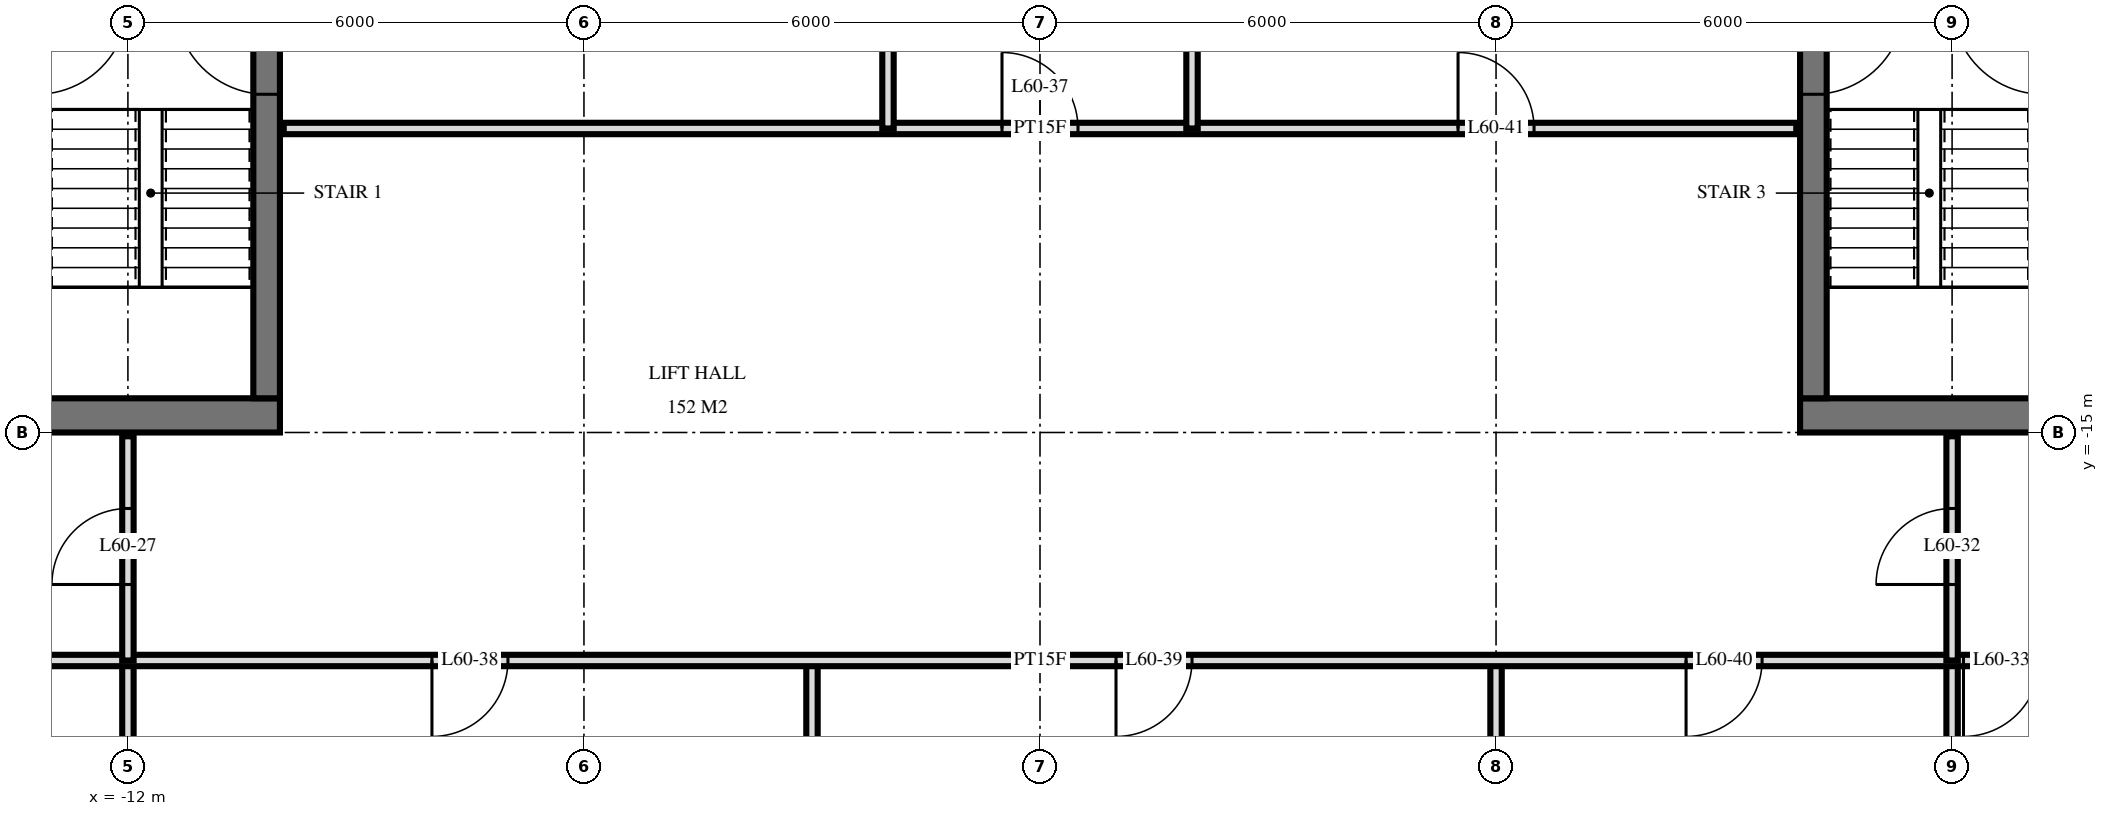
"""IFC4 building model, lengths in metres.
Left out: names, types, materials, properties, quantities, classifications, styles, units other than length and angle.
Written with IfcOpenShell. Run it as: python <this file> out.ifc"""

import sys

from ifc_helpers import new_model, si_unit, direction, frame, frame_2d, origin, place, context, subcontext, project, spatial, rectangle, extrude, element, fill, save


model = new_model("IFC4")
c1 = context("Model", 3, precision=1e-05, world=origin(), true_north=direction((0.0, 1.0)))
c2 = subcontext(c1, "Body", "Model", "MODEL_VIEW")
j1 = project(units=[si_unit("LENGTHUNIT", "METRE"), si_unit("PLANEANGLEUNIT", "RADIAN")], contexts=[c1])
p1 = place(None, origin())
s1 = spatial("IfcSite", under=j1, at=p1, CompositionType="ELEMENT")
p2 = place(p1, origin())
s2 = spatial("IfcBuilding", under=s1, at=p2, CompositionType="ELEMENT")
p3 = place(p2, frame((0.0, 0.0, 229.1)))
s3 = spatial("IfcBuildingStorey", under=s2, at=p3, CompositionType="ELEMENT", Elevation=229.1)
p4 = place(p3, frame((-24.5, -14.775, 0.0), z_axis=(0.0, 0.0, 1.0), x_axis=(1.0, 0.0, 0.0)))
e1 = element("IfcWall", 1, at=p4, inside=s3, PredefinedType="SHEAR", context=c2, shape_type="SweptSolid", body=[
    extrude(rectangle(XDim=14.5, YDim=0.45, at=frame_2d((7.25, 0.0))), origin(), (0.0, 0.0, 1.0), 3.5),
])
p5 = place(p4, frame((6.2, 0.0, 0.0)))
e2 = element("IfcOpeningElement", 2, at=p5, cuts=e1, PredefinedType="OPENING", context=c2, shape_type="SweptSolid", body=[
    extrude(rectangle(XDim=1.2, YDim=2.1, at=frame_2d((0.6, 1.05))), frame((0.0, 0.235, 0.0), z_axis=(0.0, -1.0, 0.0), x_axis=(1.0, 0.0, 0.0)), (0.0, 0.0, 1.0), 0.47),
])
p6 = place(p4, frame((9.25, 0.0, 0.0)))
e3 = element("IfcOpeningElement", 3, at=p6, cuts=e1, PredefinedType="OPENING", context=c2, shape_type="SweptSolid", body=[
    extrude(rectangle(XDim=1.1, YDim=2.1, at=frame_2d((0.55, 1.05))), frame((0.0, 0.235, 0.0), z_axis=(0.0, -1.0, 0.0), x_axis=(1.0, 0.0, 0.0)), (0.0, 0.0, 1.0), 0.47),
])
p7 = place(p4, frame((3.5, 0.0, 0.0)))
e4 = element("IfcOpeningElement", 4, at=p7, cuts=e1, PredefinedType="OPENING", context=c2, shape_type="SweptSolid", body=[
    extrude(rectangle(XDim=0.9, YDim=2.1, at=frame_2d((0.45, 1.05))), frame((0.0, 0.235, 0.0), z_axis=(0.0, -1.0, 0.0), x_axis=(1.0, 0.0, 0.0)), (0.0, 0.0, 1.0), 0.47),
])
p8 = place(p4, frame((1.05, 0.0, 0.0)))
e5 = element("IfcOpeningElement", 5, at=p8, cuts=e1, PredefinedType="OPENING", context=c2, shape_type="SweptSolid", body=[
    extrude(rectangle(XDim=1.0, YDim=2.1, at=frame_2d((0.5, 1.05))), frame((0.0, 0.235, 0.0), z_axis=(0.0, -1.0, 0.0), x_axis=(1.0, 0.0, 0.0)), (0.0, 0.0, 1.0), 0.47),
])
p9 = place(p3, frame((-10.175, -14.55, 0.0), z_axis=(0.0, 0.0, 1.0), x_axis=(0.0, 1.0, 0.0)))
e6 = element("IfcWall", 6, at=p9, inside=s3, PredefinedType="SHEAR", context=c2, shape_type="SweptSolid", body=[
    extrude(rectangle(XDim=14.1, YDim=0.35, at=frame_2d((7.05, 0.0))), origin(), (0.0, 0.0, 1.0), 3.5),
])
p10 = place(p9, frame((8.4, 0.0, 0.0)))
e7 = element("IfcOpeningElement", 7, at=p10, cuts=e6, PredefinedType="OPENING", context=c2, shape_type="SweptSolid", body=[
    extrude(rectangle(XDim=1.4, YDim=2.4, at=frame_2d((0.7, 1.2))), frame((0.0, 0.185, 0.0), z_axis=(0.0, -1.0, 0.0), x_axis=(1.0, 0.0, 0.0)), (0.0, 0.0, 1.0), 0.37),
])
p11 = place(p9, frame((10.0, 0.0, 0.0)))
e8 = element("IfcOpeningElement", 8, at=p11, cuts=e6, PredefinedType="OPENING", context=c2, shape_type="SweptSolid", body=[
    extrude(rectangle(XDim=1.4, YDim=2.4, at=frame_2d((0.7, 1.2))), frame((0.0, 0.185, 0.0), z_axis=(0.0, -1.0, 0.0), x_axis=(1.0, 0.0, 0.0)), (0.0, 0.0, 1.0), 0.37),
])
p12 = place(p9, frame((4.0, 0.0, 0.0)))
e9 = element("IfcOpeningElement", 9, at=p12, cuts=e6, PredefinedType="OPENING", context=c2, shape_type="SweptSolid", body=[
    extrude(rectangle(XDim=1.2, YDim=2.1, at=frame_2d((0.6, 1.05))), frame((0.0, 0.185, 0.0), z_axis=(0.0, -1.0, 0.0), x_axis=(1.0, 0.0, 0.0)), (0.0, 0.0, 1.0), 0.37),
])
p13 = place(p3, frame((10.0, -14.775, 0.0), z_axis=(0.0, 0.0, 1.0), x_axis=(1.0, 0.0, 0.0)))
e10 = element("IfcWall", 10, at=p13, inside=s3, PredefinedType="SHEAR", context=c2, shape_type="SweptSolid", body=[
    extrude(rectangle(XDim=14.5, YDim=0.45, at=frame_2d((7.25, 0.0))), origin(), (0.0, 0.0, 1.0), 3.5),
])
p14 = place(p13, frame((7.1, 0.0, 0.0)))
e11 = element("IfcOpeningElement", 11, at=p14, cuts=e10, PredefinedType="OPENING", context=c2, shape_type="SweptSolid", body=[
    extrude(rectangle(XDim=1.2, YDim=2.1, at=frame_2d((0.6, 1.05))), frame((0.0, 0.235, 0.0), z_axis=(0.0, -1.0, 0.0), x_axis=(1.0, 0.0, 0.0)), (0.0, 0.0, 1.0), 0.47),
])
p15 = place(p13, frame((4.15, 0.0, 0.0)))
e12 = element("IfcOpeningElement", 12, at=p15, cuts=e10, PredefinedType="OPENING", context=c2, shape_type="SweptSolid", body=[
    extrude(rectangle(XDim=1.1, YDim=2.1, at=frame_2d((0.55, 1.05))), frame((0.0, 0.235, 0.0), z_axis=(0.0, -1.0, 0.0), x_axis=(1.0, 0.0, 0.0)), (0.0, 0.0, 1.0), 0.47),
])
p16 = place(p13, frame((10.1, 0.0, 0.0)))
e13 = element("IfcOpeningElement", 13, at=p16, cuts=e10, PredefinedType="OPENING", context=c2, shape_type="SweptSolid", body=[
    extrude(rectangle(XDim=0.9, YDim=2.1, at=frame_2d((0.45, 1.05))), frame((0.0, 0.235, 0.0), z_axis=(0.0, -1.0, 0.0), x_axis=(1.0, 0.0, 0.0)), (0.0, 0.0, 1.0), 0.47),
])
p17 = place(p13, frame((12.45, 0.0, 0.0)))
e14 = element("IfcOpeningElement", 14, at=p17, cuts=e10, PredefinedType="OPENING", context=c2, shape_type="SweptSolid", body=[
    extrude(rectangle(XDim=1.0, YDim=2.1, at=frame_2d((0.5, 1.05))), frame((0.0, 0.235, 0.0), z_axis=(0.0, -1.0, 0.0), x_axis=(1.0, 0.0, 0.0)), (0.0, 0.0, 1.0), 0.47),
])
p18 = place(p3, frame((10.175, -14.55, 0.0), z_axis=(0.0, 0.0, 1.0), x_axis=(0.0, 1.0, 0.0)))
e15 = element("IfcWall", 15, at=p18, inside=s3, PredefinedType="SHEAR", context=c2, shape_type="SweptSolid", body=[
    extrude(rectangle(XDim=14.1, YDim=0.35, at=frame_2d((7.05, 0.0))), origin(), (0.0, 0.0, 1.0), 3.5),
])
p19 = place(p18, frame((8.4, 0.0, 0.0)))
e16 = element("IfcOpeningElement", 16, at=p19, cuts=e15, PredefinedType="OPENING", context=c2, shape_type="SweptSolid", body=[
    extrude(rectangle(XDim=1.4, YDim=2.4, at=frame_2d((0.7, 1.2))), frame((0.0, 0.185, 0.0), z_axis=(0.0, -1.0, 0.0), x_axis=(1.0, 0.0, 0.0)), (0.0, 0.0, 1.0), 0.37),
])
p20 = place(p18, frame((10.0, 0.0, 0.0)))
e17 = element("IfcOpeningElement", 17, at=p20, cuts=e15, PredefinedType="OPENING", context=c2, shape_type="SweptSolid", body=[
    extrude(rectangle(XDim=1.4, YDim=2.4, at=frame_2d((0.7, 1.2))), frame((0.0, 0.185, 0.0), z_axis=(0.0, -1.0, 0.0), x_axis=(1.0, 0.0, 0.0)), (0.0, 0.0, 1.0), 0.37),
])
p21 = place(p18, frame((4.0, 0.0, 0.0)))
e18 = element("IfcOpeningElement", 18, at=p21, cuts=e15, PredefinedType="OPENING", context=c2, shape_type="SweptSolid", body=[
    extrude(rectangle(XDim=1.2, YDim=2.1, at=frame_2d((0.6, 1.05))), frame((0.0, 0.185, 0.0), z_axis=(0.0, -1.0, 0.0), x_axis=(1.0, 0.0, 0.0)), (0.0, 0.0, 1.0), 0.37),
])
p22 = place(p3, frame((12.0, -18.0, 0.0), z_axis=(0.0, 0.0, 1.0), x_axis=(0.0, 1.0, 0.0)))
e19 = element("IfcWall", 19, at=p22, inside=s3, PredefinedType="PARTITIONING", context=c2, shape_type="SweptSolid", body=[
    extrude(rectangle(XDim=2.95, YDim=0.15, at=frame_2d((1.475, 0.0))), origin(), (0.0, 0.0, 1.0), 3.22),
])
p23 = place(p22, frame((1.0, 0.0, 0.0)))
e20 = element("IfcOpeningElement", 20, at=p23, cuts=e19, PredefinedType="OPENING", context=c2, shape_type="SweptSolid", body=[
    extrude(rectangle(XDim=1.0, YDim=2.1, at=frame_2d((0.5, 1.05))), frame((0.0, 0.085, 0.0), z_axis=(0.0, -1.0, 0.0), x_axis=(1.0, 0.0, 0.0)), (0.0, 0.0, 1.0), 0.17),
])
for number, where, z_axis, x_axis in (
    (21, (12.0, -29.22, 0.0), (0.0, 0.0, 1.0), (0.0, 1.0, 0.0)),
    (22, (6.0, -29.22, 0.0), (0.0, 0.0, 1.0), (0.0, 1.0, 0.0)),
):
    element("IfcWall", number, at=place(p3, frame(where, z_axis=z_axis, x_axis=x_axis)), inside=s3, PredefinedType="PARTITIONING", context=c2, shape_type="SweptSolid", body=[
        extrude(rectangle(XDim=11.22, YDim=0.15, at=frame_2d((5.61, 0.0))), origin(), (0.0, 0.0, 1.0), 3.22),
    ])
for number, where, z_axis, x_axis in (
    (23, (2.0, -11.0, 0.0), (0.0, 0.0, 1.0), (0.0, 1.0, 0.0)),
    (24, (-2.0, -11.0, 0.0), (0.0, 0.0, 1.0), (0.0, 1.0, 0.0)),
):
    element("IfcWall", number, at=place(p3, frame(where, z_axis=z_axis, x_axis=x_axis)), inside=s3, PredefinedType="PARTITIONING", context=c2, shape_type="SweptSolid", body=[
        extrude(rectangle(XDim=4.0, YDim=0.15, at=frame_2d((2.0, 0.0))), origin(), (0.0, 0.0, 1.0), 3.22),
    ])
p24 = place(p3, frame((-3.0, -29.22, 0.0), z_axis=(0.0, 0.0, 1.0), x_axis=(0.0, 1.0, 0.0)))
e25 = element("IfcWall", 25, at=p24, inside=s3, PredefinedType="PARTITIONING", context=c2, shape_type="SweptSolid", body=[
    extrude(rectangle(XDim=11.22, YDim=0.15, at=frame_2d((5.61, 0.0))), origin(), (0.0, 0.0, 1.0), 3.22),
])
p25 = place(p3, frame((-12.0, -18.0, 0.0), z_axis=(0.0, 0.0, 1.0), x_axis=(0.0, 1.0, 0.0)))
e26 = element("IfcWall", 26, at=p25, inside=s3, PredefinedType="PARTITIONING", context=c2, shape_type="SweptSolid", body=[
    extrude(rectangle(XDim=2.95, YDim=0.15, at=frame_2d((1.475, 0.0))), origin(), (0.0, 0.0, 1.0), 3.22),
])
p26 = place(p25, frame((1.0, 0.0, 0.0)))
e27 = element("IfcOpeningElement", 27, at=p26, cuts=e26, PredefinedType="OPENING", context=c2, shape_type="SweptSolid", body=[
    extrude(rectangle(XDim=1.0, YDim=2.1, at=frame_2d((0.5, 1.05))), frame((0.0, 0.085, 0.0), z_axis=(0.0, -1.0, 0.0), x_axis=(1.0, 0.0, 0.0)), (0.0, 0.0, 1.0), 0.17),
])
p27 = place(p3, frame((-12.0, -29.22, 0.0), z_axis=(0.0, 0.0, 1.0), x_axis=(0.0, 1.0, 0.0)))
e28 = element("IfcWall", 28, at=p27, inside=s3, PredefinedType="PARTITIONING", context=c2, shape_type="SweptSolid", body=[
    extrude(rectangle(XDim=11.22, YDim=0.15, at=frame_2d((5.61, 0.0))), origin(), (0.0, 0.0, 1.0), 3.22),
])
p28 = place(p3, frame((-26.82, -18.0, 0.0), z_axis=(0.0, 0.0, 1.0), x_axis=(1.0, 0.0, 0.0)))
e29 = element("IfcWall", 29, at=p28, inside=s3, PredefinedType="PARTITIONING", context=c2, shape_type="SweptSolid", body=[
    extrude(rectangle(XDim=53.64, YDim=0.15, at=frame_2d((26.82, 0.0))), origin(), (0.0, 0.0, 1.0), 3.22),
])
p29 = place(p28, frame((11.32, 0.0, 0.0)))
e30 = element("IfcOpeningElement", 30, at=p29, cuts=e29, PredefinedType="OPENING", context=c2, shape_type="SweptSolid", body=[
    extrude(rectangle(XDim=1.0, YDim=2.1, at=frame_2d((0.5, 1.05))), frame((0.0, 0.085, 0.0), z_axis=(0.0, -1.0, 0.0), x_axis=(1.0, 0.0, 0.0)), (0.0, 0.0, 1.0), 0.17),
])
p30 = place(p28, frame((3.22, 0.0, 0.0)))
e31 = element("IfcOpeningElement", 31, at=p30, cuts=e29, PredefinedType="OPENING", context=c2, shape_type="SweptSolid", body=[
    extrude(rectangle(XDim=1.0, YDim=2.1, at=frame_2d((0.5, 1.05))), frame((0.0, 0.085, 0.0), z_axis=(0.0, -1.0, 0.0), x_axis=(1.0, 0.0, 0.0)), (0.0, 0.0, 1.0), 0.17),
])
p31 = place(p28, frame((5.02, 0.0, 0.0)))
e32 = element("IfcOpeningElement", 32, at=p31, cuts=e29, PredefinedType="OPENING", context=c2, shape_type="SweptSolid", body=[
    extrude(rectangle(XDim=1.0, YDim=2.1, at=frame_2d((0.5, 1.05))), frame((0.0, 0.085, 0.0), z_axis=(0.0, -1.0, 0.0), x_axis=(1.0, 0.0, 0.0)), (0.0, 0.0, 1.0), 0.17),
])
p32 = place(p28, frame((38.97, 0.0, 0.0)))
e33 = element("IfcOpeningElement", 33, at=p32, cuts=e29, PredefinedType="OPENING", context=c2, shape_type="SweptSolid", body=[
    extrude(rectangle(XDim=1.0, YDim=2.1, at=frame_2d((0.5, 1.05))), frame((0.0, 0.085, 0.0), z_axis=(0.0, -1.0, 0.0), x_axis=(1.0, 0.0, 0.0)), (0.0, 0.0, 1.0), 0.17),
])
p33 = place(p28, frame((48.72, 0.0, 0.0)))
e34 = element("IfcOpeningElement", 34, at=p33, cuts=e29, PredefinedType="OPENING", context=c2, shape_type="SweptSolid", body=[
    extrude(rectangle(XDim=1.0, YDim=2.1, at=frame_2d((0.5, 1.05))), frame((0.0, 0.085, 0.0), z_axis=(0.0, -1.0, 0.0), x_axis=(1.0, 0.0, 0.0)), (0.0, 0.0, 1.0), 0.17),
])
p34 = place(p28, frame((46.92, 0.0, 0.0)))
e35 = element("IfcOpeningElement", 35, at=p34, cuts=e29, PredefinedType="OPENING", context=c2, shape_type="SweptSolid", body=[
    extrude(rectangle(XDim=1.0, YDim=2.1, at=frame_2d((0.5, 1.05))), frame((0.0, 0.085, 0.0), z_axis=(0.0, -1.0, 0.0), x_axis=(1.0, 0.0, 0.0)), (0.0, 0.0, 1.0), 0.17),
])
p35 = place(p28, frame((18.82, 0.0, 0.0)))
e36 = element("IfcOpeningElement", 36, at=p35, cuts=e29, PredefinedType="OPENING", context=c2, shape_type="SweptSolid", body=[
    extrude(rectangle(XDim=1.0, YDim=2.1, at=frame_2d((0.5, 1.05))), frame((0.0, 0.085, 0.0), z_axis=(0.0, -1.0, 0.0), x_axis=(1.0, 0.0, 0.0)), (0.0, 0.0, 1.0), 0.17),
])
p36 = place(p28, frame((27.82, 0.0, 0.0)))
e37 = element("IfcOpeningElement", 37, at=p36, cuts=e29, PredefinedType="OPENING", context=c2, shape_type="SweptSolid", body=[
    extrude(rectangle(XDim=1.0, YDim=2.1, at=frame_2d((0.5, 1.05))), frame((0.0, 0.085, 0.0), z_axis=(0.0, -1.0, 0.0), x_axis=(1.0, 0.0, 0.0)), (0.0, 0.0, 1.0), 0.17),
])
p37 = place(p28, frame((35.32, 0.0, 0.0)))
e38 = element("IfcOpeningElement", 38, at=p37, cuts=e29, PredefinedType="OPENING", context=c2, shape_type="SweptSolid", body=[
    extrude(rectangle(XDim=1.0, YDim=2.1, at=frame_2d((0.5, 1.05))), frame((0.0, 0.085, 0.0), z_axis=(0.0, -1.0, 0.0), x_axis=(1.0, 0.0, 0.0)), (0.0, 0.0, 1.0), 0.17),
])
p38 = place(p3, frame((-9.95, -11.0, 0.0), z_axis=(0.0, 0.0, 1.0), x_axis=(1.0, 0.0, 0.0)))
e39 = element("IfcWall", 39, at=p38, inside=s3, PredefinedType="PARTITIONING", context=c2, shape_type="SweptSolid", body=[
    extrude(rectangle(XDim=19.9, YDim=0.15, at=frame_2d((9.95, 0.0))), origin(), (0.0, 0.0, 1.0), 3.22),
])
p39 = place(p38, frame((9.45, 0.0, 0.0)))
e40 = element("IfcOpeningElement", 40, at=p39, cuts=e39, PredefinedType="OPENING", context=c2, shape_type="SweptSolid", body=[
    extrude(rectangle(XDim=1.0, YDim=2.1, at=frame_2d((0.5, 1.05))), frame((0.0, 0.085, 0.0), z_axis=(0.0, -1.0, 0.0), x_axis=(1.0, 0.0, 0.0)), (0.0, 0.0, 1.0), 0.17),
])
p40 = place(p38, frame((15.45, 0.0, 0.0)))
e41 = element("IfcOpeningElement", 41, at=p40, cuts=e39, PredefinedType="OPENING", context=c2, shape_type="SweptSolid", body=[
    extrude(rectangle(XDim=1.0, YDim=2.1, at=frame_2d((0.5, 1.05))), frame((0.0, 0.085, 0.0), z_axis=(0.0, -1.0, 0.0), x_axis=(1.0, 0.0, 0.0)), (0.0, 0.0, 1.0), 0.17),
])
p41 = place(p12, origin())
e42 = element("IfcDoor", 42, at=p41, inside=s3, OperationType="SINGLE_SWING_LEFT", PredefinedType="DOOR", context=c2, shape_type="SweptSolid", body=[
    extrude(rectangle(XDim=1.2, YDim=2.1, at=frame_2d((0.6, 1.05))), frame((0.0, 0.025, 0.0), z_axis=(0.0, -1.0, 0.0), x_axis=(1.0, 0.0, 0.0)), (0.0, 0.0, 1.0), 0.05),
])
fill(e9, e42)
p42 = place(p21, frame((0.6, 0.0, 0.0), z_axis=(0.0, 0.0, 1.0), x_axis=(-1.0, 0.0, 0.0)))
e43 = element("IfcDoor", 43, at=p42, inside=s3, OperationType="SINGLE_SWING_RIGHT", PredefinedType="DOOR", context=c2, shape_type="SweptSolid", body=[
    extrude(rectangle(XDim=1.2, YDim=2.1, at=frame_2d((0.0, 1.05))), frame((0.0, -0.025, 0.0), z_axis=(0.0, 1.0, 0.0), x_axis=(-1.0, 0.0, 0.0)), (0.0, 0.0, 1.0), 0.05),
])
fill(e18, e43)
p43 = place(p26, origin())
e44 = element("IfcDoor", 44, at=p43, inside=s3, OperationType="SINGLE_SWING_RIGHT", PredefinedType="DOOR", context=c2, shape_type="SweptSolid", body=[
    extrude(rectangle(XDim=1.0, YDim=2.1, at=frame_2d((0.5, 1.05))), frame((0.0, 0.025, 0.0), z_axis=(0.0, -1.0, 0.0), x_axis=(1.0, 0.0, 0.0)), (0.0, 0.0, 1.0), 0.05),
])
fill(e27, e44)
p44 = place(p23, origin())
e45 = element("IfcDoor", 45, at=p44, inside=s3, OperationType="SINGLE_SWING_RIGHT", PredefinedType="DOOR", context=c2, shape_type="SweptSolid", body=[
    extrude(rectangle(XDim=1.0, YDim=2.1, at=frame_2d((0.5, 1.05))), frame((0.0, 0.025, 0.0), z_axis=(0.0, -1.0, 0.0), x_axis=(1.0, 0.0, 0.0)), (0.0, 0.0, 1.0), 0.05),
])
fill(e20, e45)
p45 = place(p32, frame((0.5, 0.0, 0.0), z_axis=(0.0, 0.0, 1.0), x_axis=(-1.0, 0.0, 0.0)))
e46 = element("IfcDoor", 46, at=p45, inside=s3, OperationType="SINGLE_SWING_LEFT", PredefinedType="DOOR", context=c2, shape_type="SweptSolid", body=[
    extrude(rectangle(XDim=1.0, YDim=2.1, at=frame_2d((0.0, 1.05))), frame((0.0, -0.025, 0.0), z_axis=(0.0, 1.0, 0.0), x_axis=(-1.0, 0.0, 0.0)), (0.0, 0.0, 1.0), 0.05),
])
fill(e33, e46)
p46 = place(p39, origin())
e47 = element("IfcDoor", 47, at=p46, inside=s3, OperationType="SINGLE_SWING_RIGHT", PredefinedType="DOOR", context=c2, shape_type="SweptSolid", body=[
    extrude(rectangle(XDim=1.0, YDim=2.1, at=frame_2d((0.5, 1.05))), frame((0.0, 0.025, 0.0), z_axis=(0.0, -1.0, 0.0), x_axis=(1.0, 0.0, 0.0)), (0.0, 0.0, 1.0), 0.05),
])
fill(e40, e47)
p47 = place(p35, frame((0.5, 0.0, 0.0), z_axis=(0.0, 0.0, 1.0), x_axis=(-1.0, 0.0, 0.0)))
e48 = element("IfcDoor", 48, at=p47, inside=s3, OperationType="SINGLE_SWING_LEFT", PredefinedType="DOOR", context=c2, shape_type="SweptSolid", body=[
    extrude(rectangle(XDim=1.0, YDim=2.1, at=frame_2d((0.0, 1.05))), frame((0.0, -0.025, 0.0), z_axis=(0.0, 1.0, 0.0), x_axis=(-1.0, 0.0, 0.0)), (0.0, 0.0, 1.0), 0.05),
])
fill(e36, e48)
p48 = place(p36, frame((0.5, 0.0, 0.0), z_axis=(0.0, 0.0, 1.0), x_axis=(-1.0, 0.0, 0.0)))
e49 = element("IfcDoor", 49, at=p48, inside=s3, OperationType="SINGLE_SWING_LEFT", PredefinedType="DOOR", context=c2, shape_type="SweptSolid", body=[
    extrude(rectangle(XDim=1.0, YDim=2.1, at=frame_2d((0.0, 1.05))), frame((0.0, -0.025, 0.0), z_axis=(0.0, 1.0, 0.0), x_axis=(-1.0, 0.0, 0.0)), (0.0, 0.0, 1.0), 0.05),
])
fill(e37, e49)
p49 = place(p37, frame((0.5, 0.0, 0.0), z_axis=(0.0, 0.0, 1.0), x_axis=(-1.0, 0.0, 0.0)))
e50 = element("IfcDoor", 50, at=p49, inside=s3, OperationType="SINGLE_SWING_LEFT", PredefinedType="DOOR", context=c2, shape_type="SweptSolid", body=[
    extrude(rectangle(XDim=1.0, YDim=2.1, at=frame_2d((0.0, 1.05))), frame((0.0, -0.025, 0.0), z_axis=(0.0, 1.0, 0.0), x_axis=(-1.0, 0.0, 0.0)), (0.0, 0.0, 1.0), 0.05),
])
fill(e38, e50)
p50 = place(p40, origin())
e51 = element("IfcDoor", 51, at=p50, inside=s3, OperationType="SINGLE_SWING_RIGHT", PredefinedType="DOOR", context=c2, shape_type="SweptSolid", body=[
    extrude(rectangle(XDim=1.0, YDim=2.1, at=frame_2d((0.5, 1.05))), frame((0.0, 0.025, 0.0), z_axis=(0.0, -1.0, 0.0), x_axis=(1.0, 0.0, 0.0)), (0.0, 0.0, 1.0), 0.05),
])
fill(e41, e51)
save(model, sys.argv[1])
